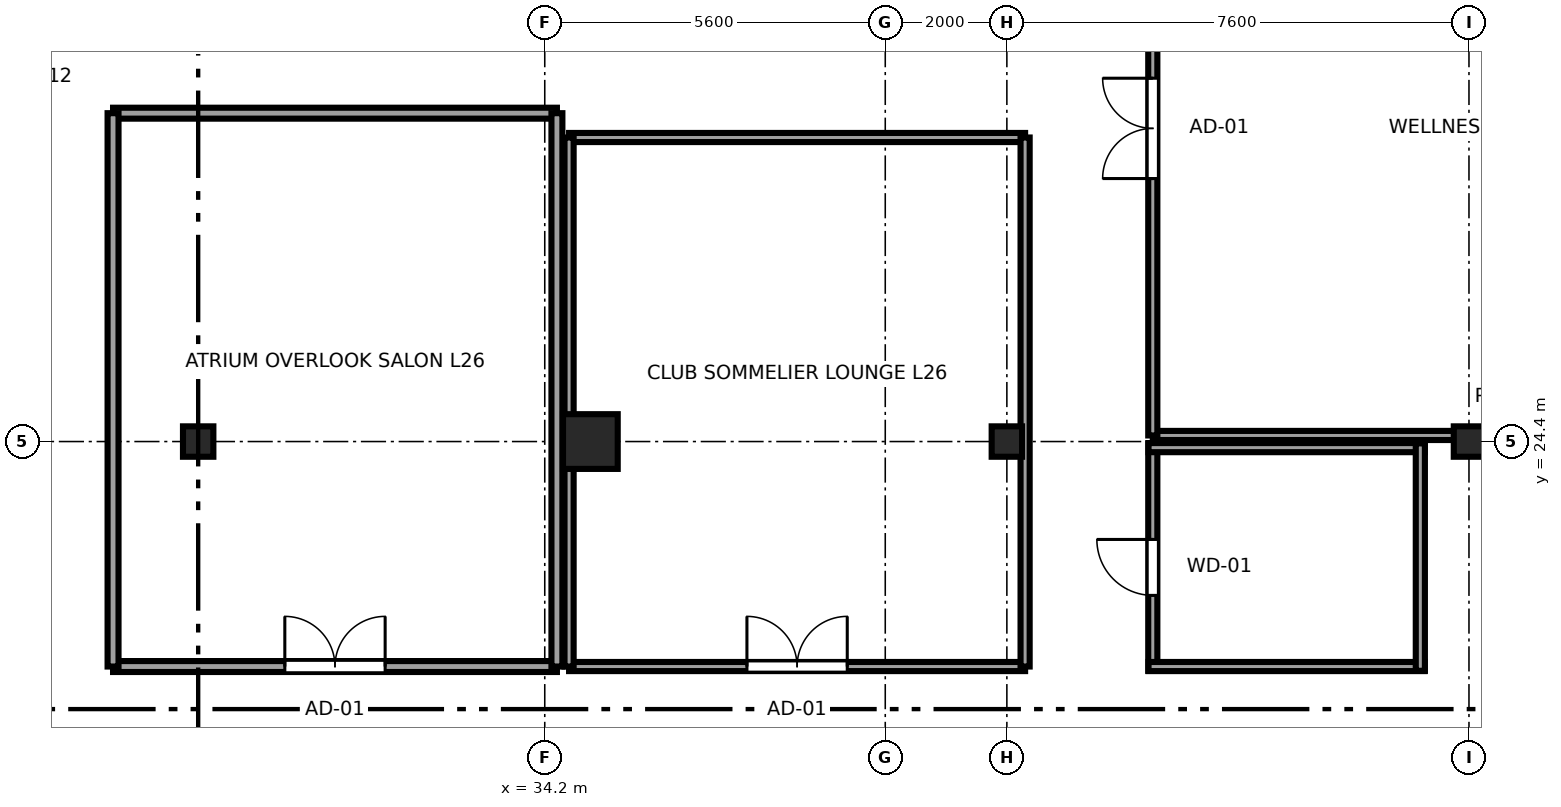
"""IFC4 building model, lengths in metres.
Left out: names, types, materials, properties, quantities, classifications, styles, units other than length and angle.
Written with IfcOpenShell. Run it as: python <this file> out.ifc"""

import sys

from ifc_helpers import new_model, si_unit, direction, frame, frame_2d, origin, origin_2d, place, context, subcontext, project, spatial, rectangle, i_section, extrude, source, transform, mapped, element, fill, save


model = new_model("IFC4")
c1 = context("Model", 3, precision=1e-05, world=origin(), true_north=direction((0.0, 1.0)))
c2 = subcontext(c1, "Body", "Model", "MODEL_VIEW")
j1 = project(units=[si_unit("LENGTHUNIT", "METRE"), si_unit("PLANEANGLEUNIT", "RADIAN")], contexts=[c1])
p1 = place(None, origin())
s1 = spatial("IfcSite", under=j1, at=p1, CompositionType="ELEMENT")
p2 = place(p1, origin())
s2 = spatial("IfcBuilding", under=s1, at=p2, CompositionType="ELEMENT")
p3 = place(p2, frame((0.0, 0.0, 104.45)))
s3 = spatial("IfcBuildingStorey", under=s2, at=p3, CompositionType="ELEMENT", Elevation=104.45)
m1 = source(origin(), c2, "Body", "SweptSolid", [
    extrude(rectangle(XDim=0.9, YDim=0.9, at=origin_2d()), origin(), (0.0, 0.0, 1.0), 3.55),
])
p4 = place(p3, frame((34.95, 24.4, 0.0), z_axis=(0.0, 0.0, 1.0), x_axis=(1.0, 0.0, 0.0)))
e1 = element("IfcColumn", 1, at=p4, inside=s3, PredefinedType="COLUMN", context=c2, shape_type="MappedRepresentation", body=[
    mapped(m1, transform((0.0, 0.0, 0.0), x_axis=(1.0, 0.0, 0.0), y_axis=(0.0, 1.0, 0.0), z_axis=(0.0, 0.0, 1.0), scale=1.0)),
])
m2 = source(origin(), c2, "Body", "SweptSolid", [
    extrude(i_section(OverallWidth=0.5, OverallDepth=0.5, WebThickness=0.022, FlangeThickness=0.034, at=origin_2d()), origin(), (0.0, 0.0, 1.0), 3.55),
])
for number, where, z_axis, x_axis in (
    (2, (41.8, 24.4, 0.0), (0.0, 0.0, 1.0), (1.0, 0.0, 0.0)),
    (3, (49.4, 24.4, 0.0), (0.0, 0.0, 1.0), (1.0, 0.0, 0.0)),
    (4, (28.5, 24.4, 0.0), (0.0, 0.0, 1.0), (1.0, 0.0, 0.0)),
):
    element("IfcColumn", number, at=place(p3, frame(where, z_axis=z_axis, x_axis=x_axis)), inside=s3, PredefinedType="COLUMN", context=c2, shape_type="MappedRepresentation", body=[
        mapped(m2, transform((0.0, 0.0, 0.0), x_axis=(1.0, 0.0, 0.0), y_axis=(0.0, 1.0, 0.0), z_axis=(0.0, 0.0, 1.0), scale=1.0)),
    ])
p5 = place(p3, frame((44.2, 20.63, 0.0), z_axis=(0.0, 0.0, 1.0), x_axis=(0.0, 1.0, 0.0)))
e5 = element("IfcWall", 5, at=p5, inside=s3, PredefinedType="PARTITIONING", context=c2, shape_type="SweptSolid", body=[
    extrude(rectangle(XDim=3.74, YDim=0.15, at=frame_2d((1.87, 0.0))), origin(), (0.0, 0.0, 1.0), 3.37),
])
p6 = place(p5, frame((1.24, 0.0, 0.0)))
e6 = element("IfcOpeningElement", 6, at=p6, cuts=e5, PredefinedType="OPENING", context=c2, shape_type="SweptSolid", body=[
    extrude(rectangle(XDim=0.92, YDim=2.01, at=frame_2d((0.46, 1.005))), frame((0.0, 0.085, 0.0), z_axis=(0.0, -1.0, 0.0), x_axis=(1.0, 0.0, 0.0)), (0.0, 0.0, 1.0), 0.17),
])
p7 = place(p3, frame((44.13, 20.7, 0.0), z_axis=(0.0, 0.0, 1.0), x_axis=(1.0, 0.0, 0.0)))
e7 = element("IfcWall", 7, at=p7, inside=s3, PredefinedType="PARTITIONING", context=c2, shape_type="SweptSolid", body=[
    extrude(rectangle(XDim=4.54, YDim=0.15, at=frame_2d((2.27, 0.0))), origin(), (0.0, 0.0, 1.0), 3.37),
])
p8 = place(p3, frame((44.13, 24.3, 0.0), z_axis=(0.0, 0.0, 1.0), x_axis=(1.0, 0.0, 0.0)))
e8 = element("IfcWall", 8, at=p8, inside=s3, PredefinedType="PARTITIONING", context=c2, shape_type="SweptSolid", body=[
    extrude(rectangle(XDim=4.54, YDim=0.15, at=frame_2d((2.27, 0.0))), origin(), (0.0, 0.0, 1.0), 2.748),
])
p9 = place(p3, frame((48.6, 20.63, 0.0), z_axis=(0.0, 0.0, 1.0), x_axis=(0.0, 1.0, 0.0)))
e9 = element("IfcWall", 9, at=p9, inside=s3, PredefinedType="PARTITIONING", context=c2, shape_type="SweptSolid", body=[
    extrude(rectangle(XDim=3.74, YDim=0.15, at=frame_2d((1.87, 0.0))), origin(), (0.0, 0.0, 1.0), 3.37),
])
p10 = place(p3, frame((44.2, 24.5, 0.0), z_axis=(0.0, 0.0, 1.0), x_axis=(1.0, 0.0, 0.0)))
e10 = element("IfcWall", 10, at=p10, inside=s3, PredefinedType="PARTITIONING", context=c2, shape_type="SweptSolid", body=[
    extrude(rectangle(XDim=12.395, YDim=0.15, at=frame_2d((6.198, 0.0))), origin(), (0.0, 0.0, 1.0), 2.748),
])
p11 = place(p3, frame((44.2, 24.5, 0.0), z_axis=(0.0, 0.0, 1.0), x_axis=(0.0, 1.0, 0.0)))
e11 = element("IfcWall", 11, at=p11, inside=s3, PredefinedType="PARTITIONING", context=c2, shape_type="SweptSolid", body=[
    extrude(rectangle(XDim=10.1, YDim=0.15, at=frame_2d((5.05, 0.0))), origin(), (0.0, 0.0, 1.0), 3.37),
])
p12 = place(p11, frame((4.225, 0.0, 0.0)))
e12 = element("IfcOpeningElement", 12, at=p12, cuts=e11, PredefinedType="OPENING", context=c2, shape_type="SweptSolid", body=[
    extrude(rectangle(XDim=1.65, YDim=2.15, at=frame_2d((0.825, 1.075))), frame((0.0, 0.085, 0.0), z_axis=(0.0, -1.0, 0.0), x_axis=(1.0, 0.0, 0.0)), (0.0, 0.0, 1.0), 0.17),
])
p13 = place(p3, frame((27.1, 20.7, 0.0), z_axis=(0.0, 0.0, 1.0), x_axis=(1.0, 0.0, 0.0)))
e13 = element("IfcWall", 13, at=p13, inside=s3, PredefinedType="PARTITIONING", context=c2, shape_type="SweptSolid", body=[
    extrude(rectangle(XDim=7.3, YDim=0.18, at=frame_2d((3.65, 0.0))), origin(), (0.0, 0.0, 1.0), 3.37),
])
p14 = place(p13, frame((2.825, 0.0, 0.0)))
e14 = element("IfcOpeningElement", 14, at=p14, cuts=e13, PredefinedType="OPENING", context=c2, shape_type="SweptSolid", body=[
    extrude(rectangle(XDim=1.65, YDim=2.15, at=frame_2d((0.825, 1.075))), frame((0.0, 0.1, 0.0), z_axis=(0.0, -1.0, 0.0), x_axis=(1.0, 0.0, 0.0)), (0.0, 0.0, 1.0), 0.2),
])
p15 = place(p3, frame((27.1, 29.8, 0.0), z_axis=(0.0, 0.0, 1.0), x_axis=(1.0, 0.0, 0.0)))
e15 = element("IfcWall", 15, at=p15, inside=s3, PredefinedType="PARTITIONING", context=c2, shape_type="SweptSolid", body=[
    extrude(rectangle(XDim=7.3, YDim=0.18, at=frame_2d((3.65, 0.0))), origin(), (0.0, 0.0, 1.0), 3.37),
])
for number, where, z_axis, x_axis in (
    (16, (27.1, 20.7, 0.0), (0.0, 0.0, 1.0), (0.0, 1.0, 0.0)),
    (17, (34.4, 20.7, 0.0), (0.0, 0.0, 1.0), (0.0, 1.0, 0.0)),
):
    element("IfcWall", number, at=place(p3, frame(where, z_axis=z_axis, x_axis=x_axis)), inside=s3, PredefinedType="PARTITIONING", context=c2, shape_type="SweptSolid", body=[
        extrude(rectangle(XDim=9.1, YDim=0.18, at=frame_2d((4.55, 0.0))), origin(), (0.0, 0.0, 1.0), 3.37),
    ])
p16 = place(p3, frame((34.6, 20.7, 0.0), z_axis=(0.0, 0.0, 1.0), x_axis=(1.0, 0.0, 0.0)))
e18 = element("IfcWall", 18, at=p16, inside=s3, PredefinedType="PARTITIONING", context=c2, shape_type="SweptSolid", body=[
    extrude(rectangle(XDim=7.5, YDim=0.15, at=frame_2d((3.75, 0.0))), origin(), (0.0, 0.0, 1.0), 3.37),
])
p17 = place(p16, frame((2.925, 0.0, 0.0)))
e19 = element("IfcOpeningElement", 19, at=p17, cuts=e18, PredefinedType="OPENING", context=c2, shape_type="SweptSolid", body=[
    extrude(rectangle(XDim=1.65, YDim=2.15, at=frame_2d((0.825, 1.075))), frame((0.0, 0.085, 0.0), z_axis=(0.0, -1.0, 0.0), x_axis=(1.0, 0.0, 0.0)), (0.0, 0.0, 1.0), 0.17),
])
p18 = place(p3, frame((34.6, 29.4, 0.0), z_axis=(0.0, 0.0, 1.0), x_axis=(1.0, 0.0, 0.0)))
e20 = element("IfcWall", 20, at=p18, inside=s3, PredefinedType="PARTITIONING", context=c2, shape_type="SweptSolid", body=[
    extrude(rectangle(XDim=7.5, YDim=0.15, at=frame_2d((3.75, 0.0))), origin(), (0.0, 0.0, 1.0), 3.37),
])
p19 = place(p3, frame((34.6, 20.7, 0.0), z_axis=(0.0, 0.0, 1.0), x_axis=(0.0, 1.0, 0.0)))
e21 = element("IfcWall", 21, at=p19, inside=s3, PredefinedType="PARTITIONING", context=c2, shape_type="SweptSolid", body=[
    extrude(rectangle(XDim=8.7, YDim=0.15, at=frame_2d((4.35, 0.0))), origin(), (0.0, 0.0, 1.0), 3.37),
])
p20 = place(p3, frame((42.1, 20.7, 0.0), z_axis=(0.0, 0.0, 1.0), x_axis=(0.0, 1.0, 0.0)))
e22 = element("IfcWall", 22, at=p20, inside=s3, PredefinedType="PARTITIONING", context=c2, shape_type="SweptSolid", body=[
    extrude(rectangle(XDim=8.7, YDim=0.15, at=frame_2d((4.35, 0.0))), origin(), (0.0, 0.0, 1.0), 2.16),
])
m3 = source(origin(), c2, "Body", "SweptSolid", [
    extrude(rectangle(XDim=0.92, YDim=2.01, at=frame_2d((0.46, 1.005))), frame((0.0, 0.025, 0.0), z_axis=(0.0, -1.0, 0.0), x_axis=(1.0, 0.0, 0.0)), (0.0, 0.0, 1.0), 0.05),
])
p21 = place(p6, origin())
e23 = element("IfcDoor", 23, at=p21, inside=s3, OperationType="SINGLE_SWING_RIGHT", PredefinedType="DOOR", context=c2, shape_type="MappedRepresentation", body=[
    mapped(m3, transform((0.0, 0.0, 0.0), x_axis=(1.0, 0.0, 0.0), y_axis=(0.0, 1.0, 0.0), z_axis=(0.0, 0.0, 1.0), scale=1.0)),
])
fill(e6, e23)
m4 = source(origin(), c2, "Body", "SweptSolid", [
    extrude(rectangle(XDim=1.65, YDim=2.15, at=frame_2d((0.825, 1.075))), frame((0.0, 0.025, 0.0), z_axis=(0.0, -1.0, 0.0), x_axis=(1.0, 0.0, 0.0)), (0.0, 0.0, 1.0), 0.05),
])
p22 = place(p12, origin())
e24 = element("IfcDoor", 24, at=p22, inside=s3, OperationType="DOUBLE_DOOR_SINGLE_SWING", PredefinedType="DOOR", context=c2, shape_type="MappedRepresentation", body=[
    mapped(m4, transform((0.0, 0.0, 0.0), x_axis=(1.0, 0.0, 0.0), y_axis=(0.0, 1.0, 0.0), z_axis=(0.0, 0.0, 1.0), scale=1.0)),
])
fill(e12, e24)
p23 = place(p14, origin())
e25 = element("IfcDoor", 25, at=p23, inside=s3, OperationType="DOUBLE_DOOR_SINGLE_SWING", PredefinedType="DOOR", context=c2, shape_type="MappedRepresentation", body=[
    mapped(m4, transform((0.0, 0.0, 0.0), x_axis=(1.0, 0.0, 0.0), y_axis=(0.0, 1.0, 0.0), z_axis=(0.0, 0.0, 1.0), scale=1.0)),
])
fill(e14, e25)
p24 = place(p17, origin())
e26 = element("IfcDoor", 26, at=p24, inside=s3, OperationType="DOUBLE_DOOR_SINGLE_SWING", PredefinedType="DOOR", context=c2, shape_type="MappedRepresentation", body=[
    mapped(m4, transform((0.0, 0.0, 0.0), x_axis=(1.0, 0.0, 0.0), y_axis=(0.0, 1.0, 0.0), z_axis=(0.0, 0.0, 1.0), scale=1.0)),
])
fill(e19, e26)
save(model, sys.argv[1])
